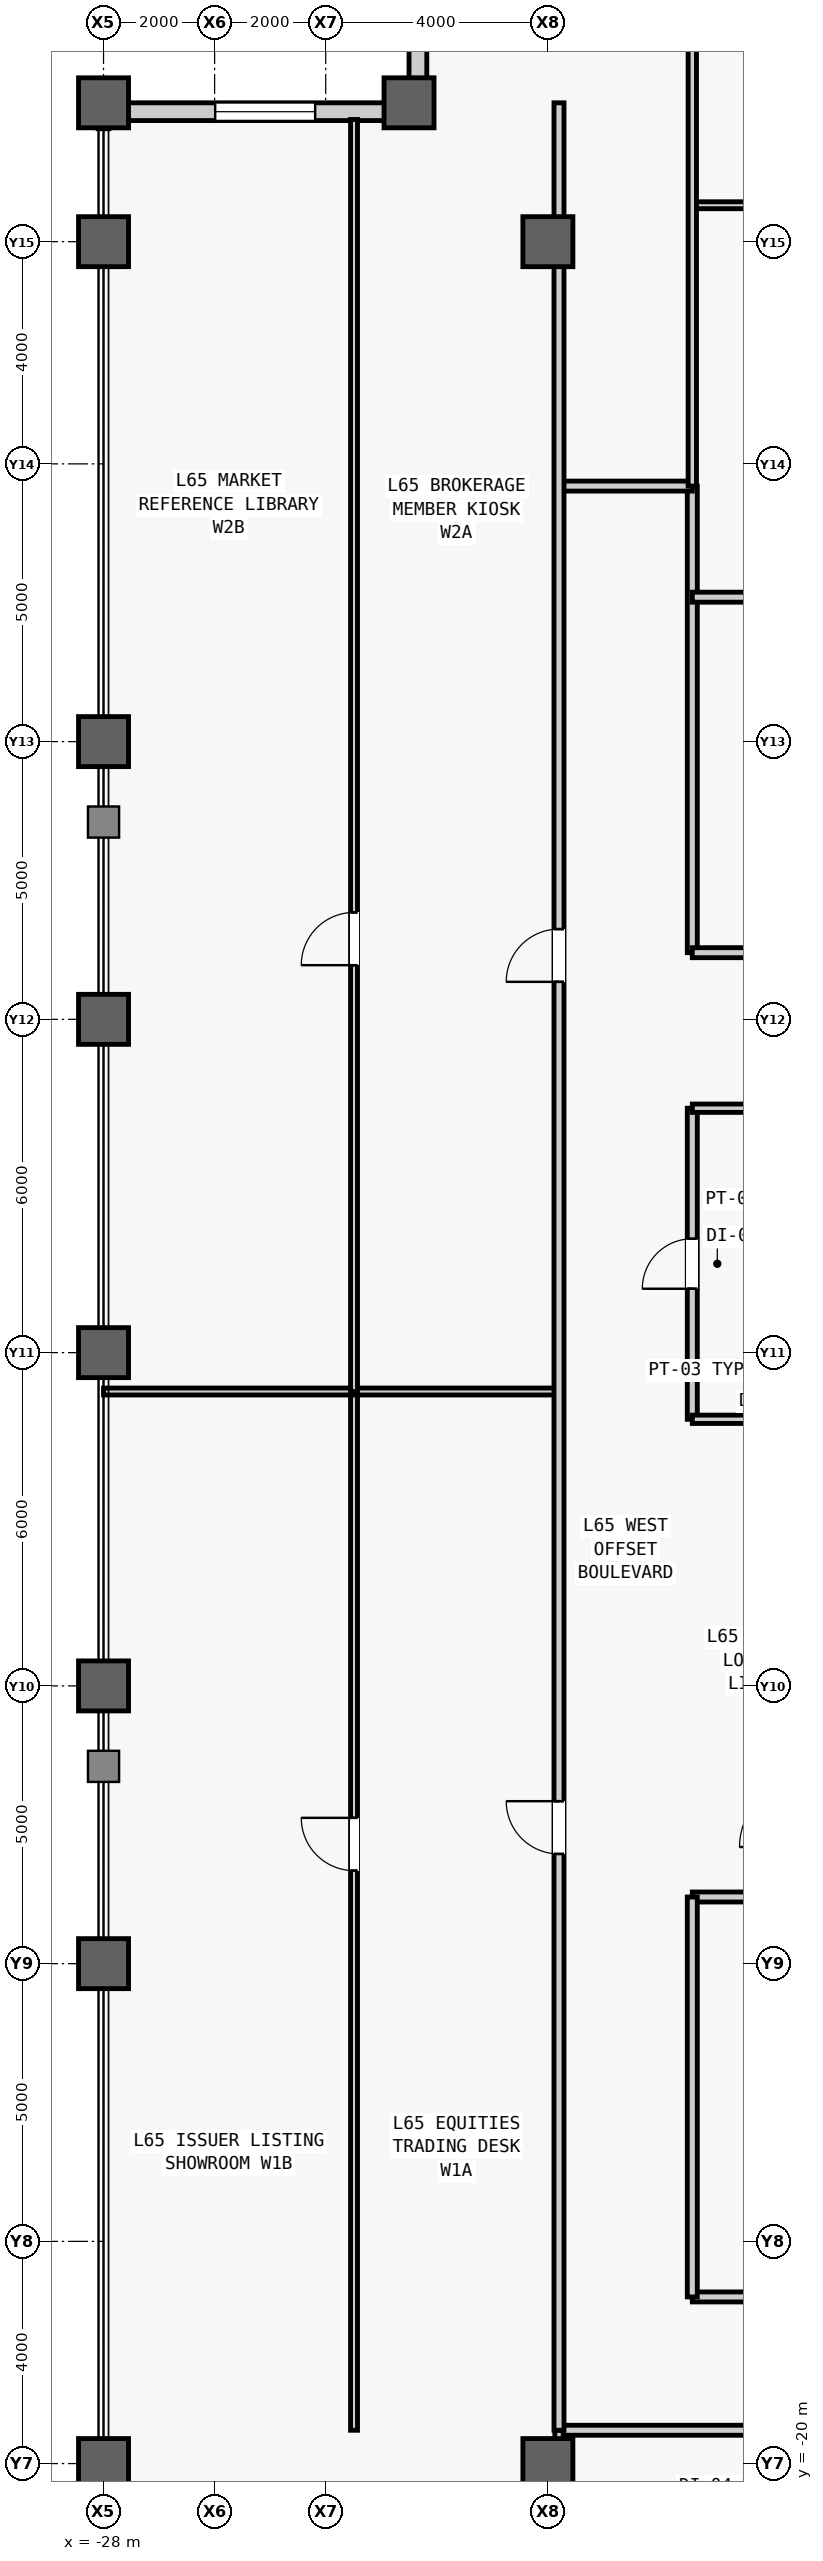
"""IFC4 building model, lengths in metres.
Left out: names, types, materials, properties, quantities, classifications, styles, units other than length and angle.
Written with IfcOpenShell. Run it as: python <this file> out.ifc"""

import sys

from ifc_helpers import new_model, si_unit, direction, frame, frame_2d, origin, origin_2d, place, context, subcontext, project, spatial, rectangle, hollow_rectangle, extrude, source, transform, mapped, element, fill, save


model = new_model("IFC4")
c1 = context("Model", 3, precision=1e-05, world=origin(), true_north=direction((0.0, 1.0)))
c2 = subcontext(c1, "Body", "Model", "MODEL_VIEW")
j1 = project(units=[si_unit("LENGTHUNIT", "METRE"), si_unit("PLANEANGLEUNIT", "RADIAN")], contexts=[c1])
p1 = place(None, origin())
s1 = spatial("IfcSite", under=j1, at=p1, CompositionType="ELEMENT")
p2 = place(p1, origin())
s2 = spatial("IfcBuilding", under=s1, at=p2, CompositionType="ELEMENT")
p3 = place(p2, frame((0.0, 0.0, 277.5)))
s3 = spatial("IfcBuildingStorey", under=s2, at=p3, CompositionType="ELEMENT", Elevation=277.5)
m1 = source(origin(), c2, "Body", "SweptSolid", [
    extrude(hollow_rectangle(XDim=0.9, YDim=0.9, WallThickness=0.05, at=origin_2d()), origin(), (0.0, 0.0, 1.0), 4.0),
])
for number, where, z_axis, x_axis in (
    (1, (-28.0, -20.0, 0.0), (0.0, 0.0, 1.0), (1.0, 0.0, 0.0)),
    (2, (-28.0, -11.0, 0.0), (0.0, 0.0, 1.0), (1.0, 0.0, 0.0)),
    (3, (-28.0, -6.0, 0.0), (0.0, 0.0, 1.0), (1.0, 0.0, 0.0)),
    (4, (-28.0, 0.0, 0.0), (0.0, 0.0, 1.0), (1.0, 0.0, 0.0)),
    (5, (-28.0, 6.0, 0.0), (0.0, 0.0, 1.0), (1.0, 0.0, 0.0)),
    (6, (-28.0, 11.0, 0.0), (0.0, 0.0, 1.0), (1.0, 0.0, 0.0)),
    (7, (-28.0, 20.0, 0.0), (0.0, 0.0, 1.0), (1.0, 0.0, 0.0)),
    (8, (-28.0, 22.5, 0.0), (0.0, 0.0, 1.0), (1.0, 0.0, 0.0)),
    (9, (-22.5, 22.5, 0.0), (0.0, 0.0, 1.0), (1.0, 0.0, 0.0)),
    (10, (-20.0, -20.0, 0.0), (0.0, 0.0, 1.0), (1.0, 0.0, 0.0)),
    (11, (-20.0, 20.0, 0.0), (0.0, 0.0, 1.0), (1.0, 0.0, 0.0)),
):
    element("IfcColumn", number, at=place(p3, frame(where, z_axis=z_axis, x_axis=x_axis)), inside=s3, PredefinedType="COLUMN", context=c2, shape_type="MappedRepresentation", body=[
        mapped(m1, transform((0.0, 0.0, 0.0), scale=1.0)),
    ])
m2 = source(origin(), c2, "Body", "SweptSolid", [
    extrude(rectangle(XDim=5.18, YDim=0.32, at=frame_2d((2.59, 0.0))), origin(), (0.0, 0.0, 1.0), 3.231),
])
p4 = place(p3, frame((-22.34, 22.5, 0.0), z_axis=(0.0, 0.0, 1.0), x_axis=(0.0, 1.0, 0.0)))
e12 = element("IfcWall", 12, at=p4, inside=s3, PredefinedType="STANDARD", context=c2, shape_type="MappedRepresentation", body=[
    mapped(m2, transform((0.0, 0.0, 0.0), scale=1.0)),
])
m3 = source(origin(), c2, "Body", "SweptSolid", [
    extrude(rectangle(XDim=1.8, YDim=2.4, at=frame_2d((0.9, 1.2))), frame((0.0, 0.17, 0.0), z_axis=(0.0, -1.0, 0.0), x_axis=(1.0, 0.0, 0.0)), (0.0, 0.0, 1.0), 0.34),
])
p5 = place(p4, frame((1.69, 0.0, 0.5)))
e13 = element("IfcOpeningElement", 13, at=p5, cuts=e12, PredefinedType="OPENING", context=c2, shape_type="MappedRepresentation", body=[
    mapped(m3, transform((0.0, 0.0, 0.0), scale=1.0)),
])
p6 = place(p3, frame((-22.5, 22.34, 0.0), z_axis=(0.0, 0.0, 1.0), x_axis=(-1.0, 0.0, 0.0)))
e14 = element("IfcWall", 14, at=p6, inside=s3, PredefinedType="STANDARD", context=c2, shape_type="MappedRepresentation", body=[
    mapped(m2, transform((0.0, 0.0, 0.0), scale=1.0)),
])
p7 = place(p6, frame((1.69, 0.0, 0.5)))
e15 = element("IfcOpeningElement", 15, at=p7, cuts=e14, PredefinedType="OPENING", context=c2, shape_type="MappedRepresentation", body=[
    mapped(m3, transform((0.0, 0.0, 0.0), scale=1.0)),
])
m4 = source(origin(), c2, "Body", "SweptSolid", [
    extrude(rectangle(XDim=5.6, YDim=0.18, at=frame_2d((2.8, 0.0))), origin(), (0.0, 0.0, 1.0), 3.78),
])
p8 = place(p3, frame((-17.4, -1.2, 0.0), z_axis=(0.0, 0.0, 1.0), x_axis=(0.0, 1.0, 0.0)))
e16 = element("IfcWall", 16, at=p8, inside=s3, PredefinedType="PARTITIONING", context=c2, shape_type="MappedRepresentation", body=[
    mapped(m4, transform((0.0, 0.0, 0.0), scale=1.0)),
])
m5 = source(origin(), c2, "Body", "SweptSolid", [
    extrude(rectangle(XDim=0.9, YDim=2.15, at=frame_2d((0.45, 1.075))), frame((0.0, 0.1, 0.0), z_axis=(0.0, -1.0, 0.0), x_axis=(1.0, 0.0, 0.0)), (0.0, 0.0, 1.0), 0.2),
])
p9 = place(p8, frame((2.35, 0.0, 0.0)))
e17 = element("IfcOpeningElement", 17, at=p9, cuts=e16, PredefinedType="OPENING", context=c2, shape_type="MappedRepresentation", body=[
    mapped(m5, transform((0.0, 0.0, 0.0), scale=1.0)),
])
m6 = source(origin(), c2, "Body", "SweptSolid", [
    extrude(rectangle(XDim=2.05, YDim=0.15, at=frame_2d((1.025, 0.0))), origin(), (0.0, 0.0, 1.0), 3.78),
])
for number, where, z_axis, x_axis in (
    (18, (-17.4, -1.2, 0.0), (0.0, 0.0, 1.0), (1.0, 0.0, 0.0)),
    (19, (-17.4, 4.4, 0.0), (0.0, 0.0, 1.0), (1.0, 0.0, 0.0)),
):
    element("IfcWall", number, at=place(p3, frame(where, z_axis=z_axis, x_axis=x_axis)), inside=s3, PredefinedType="PARTITIONING", context=c2, shape_type="MappedRepresentation", body=[
        mapped(m6, transform((0.0, 0.0, 0.0), scale=1.0)),
    ])
m7 = source(origin(), c2, "Body", "SweptSolid", [
    extrude(rectangle(XDim=2.05, YDim=0.18, at=frame_2d((1.025, 0.0))), origin(), (0.0, 0.0, 1.0), 3.78),
])
p10 = place(p3, frame((-17.4, -9.8, 0.0), z_axis=(0.0, 0.0, 1.0), x_axis=(1.0, 0.0, 0.0)))
e20 = element("IfcWall", 20, at=p10, inside=s3, PredefinedType="PARTITIONING", context=c2, shape_type="MappedRepresentation", body=[
    mapped(m7, transform((0.0, 0.0, 0.0), scale=1.0)),
])
m8 = source(origin(), c2, "Body", "SweptSolid", [
    extrude(rectangle(XDim=8.4, YDim=0.18, at=frame_2d((4.2, 0.0))), origin(), (0.0, 0.0, 1.0), 3.78),
])
p11 = place(p3, frame((-17.4, 7.2, 0.0), z_axis=(0.0, 0.0, 1.0), x_axis=(0.0, 1.0, 0.0)))
e21 = element("IfcWall", 21, at=p11, inside=s3, PredefinedType="PARTITIONING", context=c2, shape_type="MappedRepresentation", body=[
    mapped(m8, transform((0.0, 0.0, 0.0), scale=1.0)),
])
p12 = place(p3, frame((-17.4, 7.2, 0.0), z_axis=(0.0, 0.0, 1.0), x_axis=(1.0, 0.0, 0.0)))
e22 = element("IfcWall", 22, at=p12, inside=s3, PredefinedType="PARTITIONING", context=c2, shape_type="MappedRepresentation", body=[
    mapped(m7, transform((0.0, 0.0, 0.0), scale=1.0)),
])
m9 = source(origin(), c2, "Body", "SweptSolid", [
    extrude(rectangle(XDim=16.1, YDim=0.18, at=frame_2d((8.05, 0.0))), origin(), (0.0, 0.0, 1.0), 3.78),
])
p13 = place(p3, frame((-17.4, -17.0, 0.0), z_axis=(0.0, 0.0, 1.0), x_axis=(1.0, 0.0, 0.0)))
e23 = element("IfcWall", 23, at=p13, inside=s3, PredefinedType="PARTITIONING", context=c2, shape_type="MappedRepresentation", body=[
    mapped(m9, transform((0.0, 0.0, 0.0), scale=1.0)),
])
p14 = place(p13, frame((8.95, 0.0, 0.0)))
e24 = element("IfcOpeningElement", 24, at=p14, cuts=e23, PredefinedType="OPENING", context=c2, shape_type="MappedRepresentation", body=[
    mapped(m5, transform((0.0, 0.0, 0.0), scale=1.0)),
])
m10 = source(origin(), c2, "Body", "SweptSolid", [
    extrude(rectangle(XDim=7.2, YDim=0.18, at=frame_2d((3.6, 0.0))), origin(), (0.0, 0.0, 1.0), 3.78),
])
p15 = place(p3, frame((-17.4, -17.0, 0.0), z_axis=(0.0, 0.0, 1.0), x_axis=(0.0, 1.0, 0.0)))
e25 = element("IfcWall", 25, at=p15, inside=s3, PredefinedType="PARTITIONING", context=c2, shape_type="MappedRepresentation", body=[
    mapped(m10, transform((0.0, 0.0, 0.0), scale=1.0)),
])
m11 = source(origin(), c2, "Body", "SweptSolid", [
    extrude(rectangle(XDim=2.4, YDim=0.18, at=frame_2d((1.2, 0.0))), origin(), (0.0, 0.0, 1.0), 3.78),
])
p16 = place(p3, frame((-19.8, 15.6, 0.0), z_axis=(0.0, 0.0, 1.0), x_axis=(1.0, 0.0, 0.0)))
e26 = element("IfcWall", 26, at=p16, inside=s3, PredefinedType="PARTITIONING", context=c2, shape_type="MappedRepresentation", body=[
    mapped(m11, transform((0.0, 0.0, 0.0), scale=1.0)),
])
m12 = source(origin(), c2, "Body", "SweptSolid", [
    extrude(rectangle(XDim=37.55, YDim=0.18, at=frame_2d((18.775, 0.0))), origin(), (0.0, 0.0, 1.0), 3.433),
])
p17 = place(p3, frame((-19.8, -19.4, 0.0), z_axis=(0.0, 0.0, 1.0), x_axis=(1.0, 0.0, 0.0)))
e27 = element("IfcWall", 27, at=p17, inside=s3, PredefinedType="PARTITIONING", context=c2, shape_type="MappedRepresentation", body=[
    mapped(m12, transform((0.0, 0.0, 0.0), scale=1.0)),
])
m13 = source(origin(), c2, "Body", "SweptSolid", [
    extrude(rectangle(XDim=1.05, YDim=2.2, at=frame_2d((0.525, 1.1))), frame((0.0, 0.1, 0.0), z_axis=(0.0, -1.0, 0.0), x_axis=(1.0, 0.0, 0.0)), (0.0, 0.0, 1.0), 0.2),
])
p18 = place(p17, frame((3.354, 0.0, 0.0)))
e28 = element("IfcOpeningElement", 28, at=p18, cuts=e27, PredefinedType="OPENING", context=c2, shape_type="MappedRepresentation", body=[
    mapped(m13, transform((0.0, 0.0, 0.0), scale=1.0)),
])
p19 = place(p17, frame((10.74, 0.0, 0.0)))
e29 = element("IfcOpeningElement", 29, at=p19, cuts=e27, PredefinedType="OPENING", context=c2, shape_type="MappedRepresentation", body=[
    mapped(m13, transform((0.0, 0.0, 0.0), scale=1.0)),
])
p20 = place(p17, frame((20.127, 0.0, 0.0)))
e30 = element("IfcOpeningElement", 30, at=p20, cuts=e27, PredefinedType="OPENING", context=c2, shape_type="MappedRepresentation", body=[
    mapped(m13, transform((0.0, 0.0, 0.0), scale=1.0)),
])
p21 = place(p17, frame((28.388, 0.0, 0.0)))
e31 = element("IfcOpeningElement", 31, at=p21, cuts=e27, PredefinedType="OPENING", context=c2, shape_type="MappedRepresentation", body=[
    mapped(m13, transform((0.0, 0.0, 0.0), scale=1.0)),
])
p22 = place(p17, frame((33.872, 0.0, 0.0)))
e32 = element("IfcOpeningElement", 32, at=p22, cuts=e27, PredefinedType="OPENING", context=c2, shape_type="MappedRepresentation", body=[
    mapped(m13, transform((0.0, 0.0, 0.0), scale=1.0)),
])
m14 = source(origin(), c2, "Body", "SweptSolid", [
    extrude(rectangle(XDim=8.6, YDim=0.15, at=frame_2d((4.3, 0.0))), origin(), (0.0, 0.0, 1.0), 3.164),
])
p23 = place(p3, frame((-19.8, -28.0, 0.0), z_axis=(0.0, 0.0, 1.0), x_axis=(0.0, 1.0, 0.0)))
e33 = element("IfcWall", 33, at=p23, inside=s3, PredefinedType="PARTITIONING", context=c2, shape_type="MappedRepresentation", body=[
    mapped(m14, transform((0.0, 0.0, 0.0), scale=1.0)),
])
m15 = source(origin(), c2, "Body", "SweptSolid", [
    extrude(rectangle(XDim=11.135, YDim=0.125, at=frame_2d((5.567, 0.0))), origin(), (0.0, 0.0, 1.0), 3.78),
])
p24 = place(p3, frame((-17.4, 20.656, 0.0), z_axis=(0.0, 0.0, 1.0), x_axis=(1.0, 0.0, 0.0)))
e34 = element("IfcWall", 34, at=p24, inside=s3, PredefinedType="PARTITIONING", context=c2, shape_type="MappedRepresentation", body=[
    mapped(m15, transform((0.0, 0.0, 0.0), scale=1.0)),
])
m16 = source(origin(), c2, "Body", "SweptSolid", [
    extrude(rectangle(XDim=0.95, YDim=2.15, at=frame_2d((0.475, 1.075))), frame((0.0, 0.073, 0.0), z_axis=(0.0, -1.0, 0.0), x_axis=(1.0, 0.0, 0.0)), (0.0, 0.0, 1.0), 0.145),
])
p25 = place(p24, frame((5.093, 0.0, 0.0)))
e35 = element("IfcOpeningElement", 35, at=p25, cuts=e34, PredefinedType="OPENING", context=c2, shape_type="MappedRepresentation", body=[
    mapped(m16, transform((0.0, 0.0, 0.0), scale=1.0)),
])
m17 = source(origin(), c2, "Body", "SweptSolid", [
    extrude(rectangle(XDim=32.75, YDim=0.18, at=frame_2d((16.375, 0.0))), origin(), (0.0, 0.0, 1.0), 3.78),
])
p26 = place(p3, frame((-17.4, 13.6, 0.0), z_axis=(0.0, 0.0, 1.0), x_axis=(1.0, 0.0, 0.0)))
e36 = element("IfcWall", 36, at=p26, inside=s3, PredefinedType="PARTITIONING", context=c2, shape_type="MappedRepresentation", body=[
    mapped(m17, transform((0.0, 0.0, 0.0), scale=1.0)),
])
p27 = place(p26, frame((27.075, 0.0, 0.0)))
e37 = element("IfcOpeningElement", 37, at=p27, cuts=e36, PredefinedType="OPENING", context=c2, shape_type="MappedRepresentation", body=[
    mapped(m13, transform((0.0, 0.0, 0.0), scale=1.0)),
])
m18 = source(origin(), c2, "Body", "SweptSolid", [
    extrude(rectangle(XDim=12.4, YDim=0.15, at=frame_2d((6.2, 0.0))), origin(), (0.0, 0.0, 1.0), 3.78),
])
p28 = place(p3, frame((-17.4, 15.6, 0.0), z_axis=(0.0, 0.0, 1.0), x_axis=(0.0, 1.0, 0.0)))
e38 = element("IfcWall", 38, at=p28, inside=s3, PredefinedType="PARTITIONING", context=c2, shape_type="MappedRepresentation", body=[
    mapped(m18, transform((0.0, 0.0, 0.0), scale=1.0)),
])
m19 = source(origin(), c2, "Body", "SweptSolid", [
    extrude(rectangle(XDim=18.7, YDim=0.125, at=frame_2d((9.35, 0.0))), origin(), (0.0, 0.0, 1.0), 3.78),
])
p29 = place(p3, frame((-23.49, -19.4, 0.0), z_axis=(0.0, 0.0, 1.0), x_axis=(0.0, 1.0, 0.0)))
e39 = element("IfcWall", 39, at=p29, inside=s3, PredefinedType="PARTITIONING", context=c2, shape_type="MappedRepresentation", body=[
    mapped(m19, transform((0.0, 0.0, 0.0), scale=1.0)),
])
p30 = place(p29, frame((10.075, 0.0, 0.0)))
e40 = element("IfcOpeningElement", 40, at=p30, cuts=e39, PredefinedType="OPENING", context=c2, shape_type="MappedRepresentation", body=[
    mapped(m16, transform((0.0, 0.0, 0.0), scale=1.0)),
])
m20 = source(origin(), c2, "Body", "SweptSolid", [
    extrude(rectangle(XDim=8.2, YDim=0.125, at=frame_2d((4.1, 0.0))), origin(), (0.0, 0.0, 1.0), 3.78),
])
p31 = place(p3, frame((-28.0, -0.7, 0.0), z_axis=(0.0, 0.0, 1.0), x_axis=(1.0, 0.0, 0.0)))
e41 = element("IfcWall", 41, at=p31, inside=s3, PredefinedType="PARTITIONING", context=c2, shape_type="MappedRepresentation", body=[
    mapped(m20, transform((0.0, 0.0, 0.0), scale=1.0)),
])
m21 = source(origin(), c2, "Body", "SweptSolid", [
    extrude(rectangle(XDim=22.9, YDim=0.125, at=frame_2d((11.45, 0.0))), origin(), (0.0, 0.0, 1.0), 3.78),
])
p32 = place(p3, frame((-23.49, -0.7, 0.0), z_axis=(0.0, 0.0, 1.0), x_axis=(0.0, 1.0, 0.0)))
e42 = element("IfcWall", 42, at=p32, inside=s3, PredefinedType="PARTITIONING", context=c2, shape_type="MappedRepresentation", body=[
    mapped(m21, transform((0.0, 0.0, 0.0), scale=1.0)),
])
p33 = place(p32, frame((7.675, 0.0, 0.0)))
e43 = element("IfcOpeningElement", 43, at=p33, cuts=e42, PredefinedType="OPENING", context=c2, shape_type="MappedRepresentation", body=[
    mapped(m16, transform((0.0, 0.0, 0.0), scale=1.0)),
])
m22 = source(origin(), c2, "Body", "SweptSolid", [
    extrude(rectangle(XDim=41.9, YDim=0.18, at=frame_2d((20.95, 0.0))), origin(), (0.0, 0.0, 1.0), 3.164),
])
p34 = place(p3, frame((-19.8, -19.4, 0.0), z_axis=(0.0, 0.0, 1.0), x_axis=(0.0, 1.0, 0.0)))
e44 = element("IfcWall", 44, at=p34, inside=s3, PredefinedType="PARTITIONING", context=c2, shape_type="MappedRepresentation", body=[
    mapped(m22, transform((0.0, 0.0, 0.0), scale=1.0)),
])
m23 = source(origin(), c2, "Body", "SweptSolid", [
    extrude(rectangle(XDim=0.95, YDim=2.15, at=frame_2d((0.475, 1.075))), frame((0.0, 0.1, 0.0), z_axis=(0.0, -1.0, 0.0), x_axis=(1.0, 0.0, 0.0)), (0.0, 0.0, 1.0), 0.2),
])
p35 = place(p34, frame((10.375, 0.0, 0.0)))
e45 = element("IfcOpeningElement", 45, at=p35, cuts=e44, PredefinedType="OPENING", context=c2, shape_type="MappedRepresentation", body=[
    mapped(m23, transform((0.0, 0.0, 0.0), scale=1.0)),
])
p36 = place(p34, frame((26.075, 0.0, 0.0)))
e46 = element("IfcOpeningElement", 46, at=p36, cuts=e44, PredefinedType="OPENING", context=c2, shape_type="MappedRepresentation", body=[
    mapped(m23, transform((0.0, 0.0, 0.0), scale=1.0)),
])
m24 = source(origin(), c2, "Body", "SweptSolid", [
    extrude(rectangle(XDim=1.8, YDim=2.4, at=frame_2d((0.9, 1.2))), frame((0.0, 0.03, 0.0), z_axis=(0.0, -1.0, 0.0), x_axis=(1.0, 0.0, 0.0)), (0.0, 0.0, 1.0), 0.06),
])
p37 = place(p7, origin())
e47 = element("IfcWindow", 47, at=p37, inside=s3, PartitioningType="SINGLE_PANEL", PredefinedType="WINDOW", context=c2, shape_type="MappedRepresentation", body=[
    mapped(m24, transform((0.0, 0.0, 0.0), scale=1.0)),
])
fill(e15, e47)
m25 = source(origin(), c2, "Body", "SweptSolid", [
    extrude(rectangle(XDim=0.9, YDim=2.15, at=frame_2d((0.45, 1.075))), frame((0.0, 0.025, 0.0), z_axis=(0.0, -1.0, 0.0), x_axis=(1.0, 0.0, 0.0)), (0.0, 0.0, 1.0), 0.05),
])
p38 = place(p9, origin())
e48 = element("IfcDoor", 48, at=p38, inside=s3, OperationType="SINGLE_SWING_LEFT", PredefinedType="DOOR", context=c2, shape_type="MappedRepresentation", body=[
    mapped(m25, transform((0.0, 0.0, 0.0), scale=1.0)),
])
fill(e17, e48)
m26 = source(origin(), c2, "Body", "SweptSolid", [
    extrude(rectangle(XDim=0.95, YDim=2.15, at=frame_2d((0.475, 1.075))), frame((0.0, 0.025, 0.0), z_axis=(0.0, -1.0, 0.0), x_axis=(1.0, 0.0, 0.0)), (0.0, 0.0, 1.0), 0.05),
])
p39 = place(p30, origin())
e49 = element("IfcDoor", 49, at=p39, inside=s3, OperationType="SINGLE_SWING_RIGHT", PredefinedType="DOOR", context=c2, shape_type="MappedRepresentation", body=[
    mapped(m26, transform((0.0, 0.0, 0.0), scale=1.0)),
])
fill(e40, e49)
p40 = place(p33, origin())
e50 = element("IfcDoor", 50, at=p40, inside=s3, OperationType="SINGLE_SWING_LEFT", PredefinedType="DOOR", context=c2, shape_type="MappedRepresentation", body=[
    mapped(m26, transform((0.0, 0.0, 0.0), scale=1.0)),
])
fill(e43, e50)
p41 = place(p35, origin())
e51 = element("IfcDoor", 51, at=p41, inside=s3, OperationType="SINGLE_SWING_RIGHT", PredefinedType="DOOR", context=c2, shape_type="MappedRepresentation", body=[
    mapped(m26, transform((0.0, 0.0, 0.0), scale=1.0)),
])
fill(e45, e51)
p42 = place(p36, origin())
e52 = element("IfcDoor", 52, at=p42, inside=s3, OperationType="SINGLE_SWING_LEFT", PredefinedType="DOOR", context=c2, shape_type="MappedRepresentation", body=[
    mapped(m26, transform((0.0, 0.0, 0.0), scale=1.0)),
])
fill(e46, e52)
save(model, sys.argv[1])
